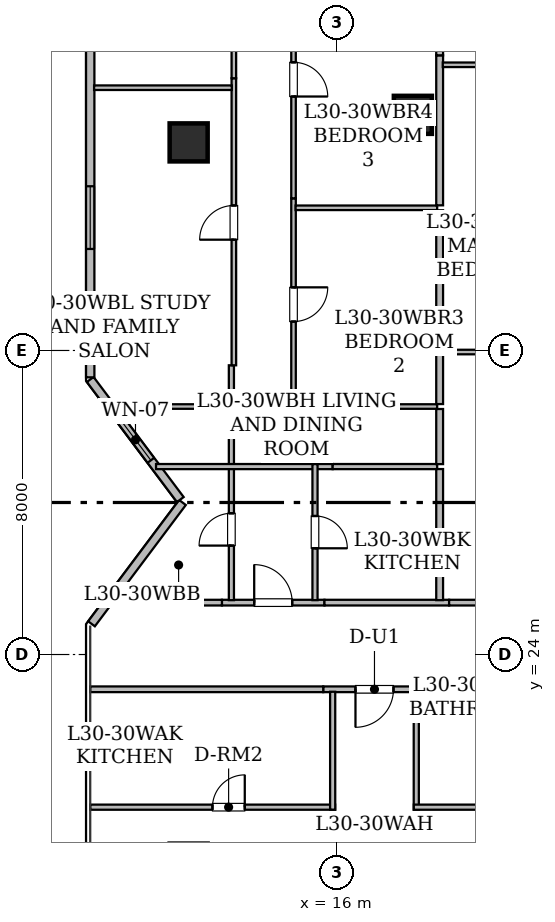
"""IFC4 building model, lengths in metres.
Left out: names, types, materials, properties, quantities, classifications, styles, units other than length and angle.
Written with IfcOpenShell. Run it as: python <this file> out.ifc"""

import sys

from ifc_helpers import new_model, si_unit, direction, frame, frame_2d, origin, origin_2d, place, context, subcontext, project, spatial, rectangle, hollow_rectangle, extrude, element, fill, save


model = new_model("IFC4")
c1 = context("Model", 3, precision=1e-05, world=origin(), true_north=direction((0.0, 1.0)))
c2 = subcontext(c1, "Body", "Model", "MODEL_VIEW")
j1 = project(units=[si_unit("LENGTHUNIT", "METRE"), si_unit("PLANEANGLEUNIT", "RADIAN")], contexts=[c1])
p1 = place(None, origin())
s1 = spatial("IfcSite", under=j1, at=p1, CompositionType="ELEMENT")
p2 = place(p1, origin())
s2 = spatial("IfcBuilding", under=s1, at=p2, CompositionType="ELEMENT")
p3 = place(p2, frame((0.0, 0.0, 120.15)))
s3 = spatial("IfcBuildingStorey", under=s2, at=p3, CompositionType="ELEMENT", Elevation=120.15)
for number, where, z_axis, x_axis in (
    (1, (12.1, 37.475, 0.0), (0.0, 0.0, 1.0), (1.0, 0.0, 0.0)),
    (2, (18.0, 38.2, 0.0), (0.0, 0.0, 1.0), (1.0, 0.0, 0.0)),
):
    element("IfcColumn", number, at=place(p3, frame(where, z_axis=z_axis, x_axis=x_axis)), inside=s3, PredefinedType="COLUMN", context=c2, shape_type="SweptSolid", body=[
        extrude(hollow_rectangle(XDim=1.0, YDim=1.0, WallThickness=0.05, at=origin_2d()), origin(), (0.0, 0.0, 1.0), 3.65),
    ])
p4 = place(p3, frame((9.544, 24.808, 0.0), z_axis=(0.0, 0.0, 1.0), x_axis=(0.600019580308, 0.799985314394, 0.0)))
e3 = element("IfcWall", 3, at=p4, inside=s3, PredefinedType="STANDARD", context=c2, shape_type="SweptSolid", body=[
    extrude(rectangle(XDim=3.99, YDim=0.22, at=frame_2d((1.995, 0.0))), origin(), (0.0, 0.0, 1.0), 3.43),
])
p5 = place(p3, frame((11.881, 28.077, 0.0), z_axis=(0.0, 0.0, 1.0), x_axis=(-0.600158184825, 0.799881336942, 0.0)))
e4 = element("IfcWall", 4, at=p5, inside=s3, PredefinedType="STANDARD", context=c2, shape_type="SweptSolid", body=[
    extrude(rectangle(XDim=3.951, YDim=0.22, at=frame_2d((1.975, 0.0))), origin(), (0.0, 0.0, 1.0), 3.43),
])
p6 = place(p5, frame((1.291, 0.0, 0.85)))
e5 = element("IfcOpeningElement", 5, at=p6, cuts=e4, PredefinedType="OPENING", context=c2, shape_type="SweptSolid", body=[
    extrude(rectangle(XDim=1.35, YDim=1.5, at=frame_2d((0.675, 0.75))), frame((0.0, 0.12, 0.0), z_axis=(0.0, -1.0, 0.0), x_axis=(1.0, 0.0, 0.0)), (0.0, 0.0, 1.0), 0.24),
])
p7 = place(p3, frame((9.51, 31.293, 0.0), z_axis=(0.0, 0.0, 1.0), x_axis=(0.0, 1.0, 0.0)))
e6 = element("IfcWall", 6, at=p7, inside=s3, PredefinedType="STANDARD", context=c2, shape_type="SweptSolid", body=[
    extrude(rectangle(XDim=14.061, YDim=0.22, at=frame_2d((7.031, 0.0))), origin(), (0.0, 0.0, 1.0), 3.43),
])
p8 = place(p7, frame((3.378, 0.0, 0.85)))
e7 = element("IfcOpeningElement", 7, at=p8, cuts=e6, PredefinedType="OPENING", context=c2, shape_type="SweptSolid", body=[
    extrude(rectangle(XDim=1.65, YDim=1.55, at=frame_2d((0.825, 0.775))), frame((0.0, 0.12, 0.0), z_axis=(0.0, -1.0, 0.0), x_axis=(1.0, 0.0, 0.0)), (0.0, 0.0, 1.0), 0.24),
])
p9 = place(p7, frame((9.624, 0.0, 0.85)))
e8 = element("IfcOpeningElement", 8, at=p9, cuts=e6, PredefinedType="OPENING", context=c2, shape_type="SweptSolid", body=[
    extrude(rectangle(XDim=1.65, YDim=1.55, at=frame_2d((0.825, 0.775))), frame((0.0, 0.12, 0.0), z_axis=(0.0, -1.0, 0.0), x_axis=(1.0, 0.0, 0.0)), (0.0, 0.0, 1.0), 0.24),
])
p10 = place(p3, frame((18.339, 23.085, 0.0), z_axis=(0.0, 0.0, 1.0), x_axis=(-1.0, 0.0, 0.0)))
e9 = element("IfcWall", 9, at=p10, inside=s3, PredefinedType="STANDARD", context=c2, shape_type="SweptSolid", body=[
    extrude(rectangle(XDim=2.698, YDim=0.15, at=frame_2d((1.349, 0.0))), origin(), (0.0, 0.0, 1.0), 2.647),
])
p11 = place(p10, frame((0.849, 0.0, 0.0)))
e10 = element("IfcOpeningElement", 10, at=p11, cuts=e9, PredefinedType="OPENING", context=c2, shape_type="SweptSolid", body=[
    extrude(rectangle(XDim=1.0, YDim=2.15, at=frame_2d((0.5, 1.075))), frame((0.0, 0.085, 0.0), z_axis=(0.0, -1.0, 0.0), x_axis=(1.0, 0.0, 0.0)), (0.0, 0.0, 1.0), 0.17),
])
p12 = place(p3, frame((22.706, 23.085, 0.0), z_axis=(0.0, 0.0, 1.0), x_axis=(-1.0, 0.0, 0.0)))
e11 = element("IfcWall", 11, at=p12, inside=s3, PredefinedType="STANDARD", context=c2, shape_type="SweptSolid", body=[
    extrude(rectangle(XDim=4.367, YDim=0.15, at=frame_2d((2.184, 0.0))), origin(), (0.0, 0.0, 1.0), 3.43),
])
p13 = place(p3, frame((15.641, 23.085, 0.0), z_axis=(0.0, 0.0, 1.0), x_axis=(-1.0, 0.0, 0.0)))
e12 = element("IfcWall", 12, at=p13, inside=s3, PredefinedType="STANDARD", context=c2, shape_type="SweptSolid", body=[
    extrude(rectangle(XDim=6.131, YDim=0.15, at=frame_2d((3.065, 0.0))), origin(), (0.0, 0.0, 1.0), 2.876),
])
p14 = place(p3, frame((12.976, 25.365, 0.0), z_axis=(0.0, 0.0, 1.0), x_axis=(1.0, 0.0, 0.0)))
e13 = element("IfcWall", 13, at=p14, inside=s3, PredefinedType="STANDARD", context=c2, shape_type="SweptSolid", body=[
    extrude(rectangle(XDim=2.698, YDim=0.15, at=frame_2d((1.349, 0.0))), origin(), (0.0, 0.0, 1.0), 3.43),
])
p15 = place(p14, frame((0.849, 0.0, 0.0)))
e14 = element("IfcOpeningElement", 14, at=p15, cuts=e13, PredefinedType="OPENING", context=c2, shape_type="SweptSolid", body=[
    extrude(rectangle(XDim=1.0, YDim=2.15, at=frame_2d((0.5, 1.075))), frame((0.0, 0.085, 0.0), z_axis=(0.0, -1.0, 0.0), x_axis=(1.0, 0.0, 0.0)), (0.0, 0.0, 1.0), 0.17),
])
p16 = place(p3, frame((9.974, 25.365, 0.0), z_axis=(0.0, 0.0, 1.0), x_axis=(1.0, 0.0, 0.0)))
e15 = element("IfcWall", 15, at=p16, inside=s3, PredefinedType="STANDARD", context=c2, shape_type="SweptSolid", body=[
    extrude(rectangle(XDim=3.002, YDim=0.15, at=frame_2d((1.501, 0.0))), origin(), (0.0, 0.0, 1.0), 2.876),
])
p17 = place(p3, frame((15.674, 25.365, 0.0), z_axis=(0.0, 0.0, 1.0), x_axis=(1.0, 0.0, 0.0)))
e16 = element("IfcWall", 16, at=p17, inside=s3, PredefinedType="STANDARD", context=c2, shape_type="SweptSolid", body=[
    extrude(rectangle(XDim=3.28, YDim=0.15, at=frame_2d((1.64, 0.0))), origin(), (0.0, 0.0, 1.0), 2.647),
])
p18 = place(p3, frame((18.954, 25.365, 0.0), z_axis=(0.0, 0.0, 1.0), x_axis=(1.0, 0.0, 0.0)))
e17 = element("IfcWall", 17, at=p18, inside=s3, PredefinedType="STANDARD", context=c2, shape_type="SweptSolid", body=[
    extrude(rectangle(XDim=3.522, YDim=0.15, at=frame_2d((1.761, 0.0))), origin(), (0.0, 0.0, 1.0), 3.43),
])
p19 = place(p3, frame((18.09, 23.02, 0.0), z_axis=(0.0, 0.0, 1.0), x_axis=(0.0, -1.0, 0.0)))
e18 = element("IfcWall", 18, at=p19, inside=s3, PredefinedType="PARTITIONING", context=c2, shape_type="SweptSolid", body=[
    extrude(rectangle(XDim=3.102, YDim=0.135, at=frame_2d((1.551, 0.0))), origin(), (0.0, 0.0, 1.0), 2.647),
])
p20 = place(p3, frame((18.025, 19.983, 0.0), z_axis=(0.0, 0.0, 1.0), x_axis=(1.0, 0.0, 0.0)))
e19 = element("IfcWall", 19, at=p20, inside=s3, PredefinedType="PARTITIONING", context=c2, shape_type="SweptSolid", body=[
    extrude(rectangle(XDim=4.995, YDim=0.135, at=frame_2d((2.498, 0.0))), origin(), (0.0, 0.0, 1.0), 2.647),
])
p21 = place(p20, frame((2.073, 0.0, 0.0)))
e20 = element("IfcOpeningElement", 20, at=p21, cuts=e19, PredefinedType="OPENING", context=c2, shape_type="SweptSolid", body=[
    extrude(rectangle(XDim=0.85, YDim=2.1, at=frame_2d((0.425, 1.05))), frame((0.0, 0.077, 0.0), z_axis=(0.0, -1.0, 0.0), x_axis=(1.0, 0.0, 0.0)), (0.0, 0.0, 1.0), 0.155),
])
p22 = place(p3, frame((9.51, 19.983, 0.0), z_axis=(0.0, 0.0, 1.0), x_axis=(1.0, 0.0, 0.0)))
e21 = element("IfcWall", 21, at=p22, inside=s3, PredefinedType="PARTITIONING", context=c2, shape_type="SweptSolid", body=[
    extrude(rectangle(XDim=6.445, YDim=0.135, at=frame_2d((3.223, 0.0))), origin(), (0.0, 0.0, 1.0), 2.876),
])
p23 = place(p22, frame((3.217, 0.0, 0.0)))
e22 = element("IfcOpeningElement", 22, at=p23, cuts=e21, PredefinedType="OPENING", context=c2, shape_type="SweptSolid", body=[
    extrude(rectangle(XDim=0.85, YDim=2.1, at=frame_2d((0.425, 1.05))), frame((0.0, 0.077, 0.0), z_axis=(0.0, -1.0, 0.0), x_axis=(1.0, 0.0, 0.0)), (0.0, 0.0, 1.0), 0.155),
])
p24 = place(p3, frame((15.89, 19.918, 0.0), z_axis=(0.0, 0.0, 1.0), x_axis=(0.0, 1.0, 0.0)))
e23 = element("IfcWall", 23, at=p24, inside=s3, PredefinedType="PARTITIONING", context=c2, shape_type="SweptSolid", body=[
    extrude(rectangle(XDim=3.102, YDim=0.135, at=frame_2d((1.551, 0.0))), origin(), (0.0, 0.0, 1.0), 3.43),
])
p25 = place(p3, frame((13.225, 25.43, 0.0), z_axis=(0.0, 0.0, 1.0), x_axis=(0.0, 1.0, 0.0)))
e24 = element("IfcWall", 24, at=p25, inside=s3, PredefinedType="PARTITIONING", context=c2, shape_type="SweptSolid", body=[
    extrude(rectangle(XDim=6.18, YDim=0.135, at=frame_2d((3.09, 0.0))), origin(), (0.0, 0.0, 1.0), 3.43),
])
p26 = place(p25, frame((1.436, 0.0, 0.0)))
e25 = element("IfcOpeningElement", 25, at=p26, cuts=e24, PredefinedType="OPENING", context=c2, shape_type="SweptSolid", body=[
    extrude(rectangle(XDim=0.85, YDim=2.1, at=frame_2d((0.425, 1.05))), frame((0.0, 0.077, 0.0), z_axis=(0.0, -1.0, 0.0), x_axis=(1.0, 0.0, 0.0)), (0.0, 0.0, 1.0), 0.155),
])
p27 = place(p3, frame((15.89, 28.945, 0.0), z_axis=(0.0, 0.0, 1.0), x_axis=(-1.0, 0.0, 0.0)))
e26 = element("IfcWall", 26, at=p27, inside=s3, PredefinedType="PARTITIONING", context=c2, shape_type="SweptSolid", body=[
    extrude(rectangle(XDim=4.648, YDim=0.135, at=frame_2d((2.324, 0.0))), origin(), (0.0, 0.0, 1.0), 2.876),
])
p28 = place(p3, frame((18.64, 28.945, 0.0), z_axis=(0.0, 0.0, 1.0), x_axis=(-1.0, 0.0, 0.0)))
e27 = element("IfcWall", 27, at=p28, inside=s3, PredefinedType="PARTITIONING", context=c2, shape_type="SweptSolid", body=[
    extrude(rectangle(XDim=2.75, YDim=0.135, at=frame_2d((1.375, 0.0))), origin(), (0.0, 0.0, 1.0), 2.647),
])
p29 = place(p3, frame((15.425, 29.01, 0.0), z_axis=(0.0, 0.0, 1.0), x_axis=(0.0, -1.0, 0.0)))
e28 = element("IfcWall", 28, at=p29, inside=s3, PredefinedType="PARTITIONING", context=c2, shape_type="SweptSolid", body=[
    extrude(rectangle(XDim=3.58, YDim=0.135, at=frame_2d((1.79, 0.0))), origin(), (0.0, 0.0, 1.0), 3.43),
])
p30 = place(p29, frame((1.365, 0.0, 0.0)))
e29 = element("IfcOpeningElement", 29, at=p30, cuts=e28, PredefinedType="OPENING", context=c2, shape_type="SweptSolid", body=[
    extrude(rectangle(XDim=0.85, YDim=2.1, at=frame_2d((0.425, 1.05))), frame((0.0, 0.077, 0.0), z_axis=(0.0, -1.0, 0.0), x_axis=(1.0, 0.0, 0.0)), (0.0, 0.0, 1.0), 0.155),
])
p31 = place(p3, frame((13.29, 31.61, 0.0), z_axis=(0.0, 0.0, 1.0), x_axis=(0.0, 1.0, 0.0)))
e30 = element("IfcWall", 30, at=p31, inside=s3, PredefinedType="PARTITIONING", context=c2, shape_type="SweptSolid", body=[
    extrude(rectangle(XDim=7.553, YDim=0.12, at=frame_2d((3.776, 0.0))), origin(), (0.0, 0.0, 1.0), 2.687),
])
p32 = place(p31, frame((3.305, 0.0, 0.0)))
e31 = element("IfcOpeningElement", 31, at=p32, cuts=e30, PredefinedType="OPENING", context=c2, shape_type="SweptSolid", body=[
    extrude(rectangle(XDim=0.9, YDim=2.1, at=frame_2d((0.45, 1.05))), frame((0.0, 0.07, 0.0), z_axis=(0.0, -1.0, 0.0), x_axis=(1.0, 0.0, 0.0)), (0.0, 0.0, 1.0), 0.14),
])
p33 = place(p3, frame((10.156, 30.525, 0.0), z_axis=(0.0, 0.0, 1.0), x_axis=(1.0, 0.0, 0.0)))
e32 = element("IfcWall", 32, at=p33, inside=s3, PredefinedType="PARTITIONING", context=c2, shape_type="SweptSolid", body=[
    extrude(rectangle(XDim=3.134, YDim=0.12, at=frame_2d((1.567, 0.0))), origin(), (0.0, 0.0, 1.0), 2.876),
])
p34 = place(p3, frame((13.29, 39.163, 0.0), z_axis=(0.0, 0.0, 1.0), x_axis=(0.0, 1.0, 0.0)))
e33 = element("IfcWall", 33, at=p34, inside=s3, PredefinedType="PARTITIONING", context=c2, shape_type="SweptSolid", body=[
    extrude(rectangle(XDim=9.98, YDim=0.12, at=frame_2d((4.99, 0.0))), origin(), (0.0, 0.0, 1.0), 2.876),
])
p35 = place(p34, frame((4.54, 0.0, 0.0)))
e34 = element("IfcOpeningElement", 34, at=p35, cuts=e33, PredefinedType="OPENING", context=c2, shape_type="SweptSolid", body=[
    extrude(rectangle(XDim=0.9, YDim=2.1, at=frame_2d((0.45, 1.05))), frame((0.0, 0.07, 0.0), z_axis=(0.0, -1.0, 0.0), x_axis=(1.0, 0.0, 0.0)), (0.0, 0.0, 1.0), 0.14),
])
p36 = place(p3, frame((14.86, 36.003, 0.0), z_axis=(0.0, 0.0, 1.0), x_axis=(0.0, -1.0, 0.0)))
e35 = element("IfcWall", 35, at=p36, inside=s3, PredefinedType="PARTITIONING", context=c2, shape_type="SweptSolid", body=[
    extrude(rectangle(XDim=5.543, YDim=0.12, at=frame_2d((2.771, 0.0))), origin(), (0.0, 0.0, 1.0), 2.687),
])
p37 = place(p36, frame((2.342, 0.0, 0.0)))
e36 = element("IfcOpeningElement", 36, at=p37, cuts=e35, PredefinedType="OPENING", context=c2, shape_type="SweptSolid", body=[
    extrude(rectangle(XDim=0.9, YDim=2.1, at=frame_2d((0.45, 1.05))), frame((0.0, 0.07, 0.0), z_axis=(0.0, -1.0, 0.0), x_axis=(1.0, 0.0, 0.0)), (0.0, 0.0, 1.0), 0.14),
])
p38 = place(p3, frame((14.795, 30.525, 0.0), z_axis=(0.0, 0.0, 1.0), x_axis=(1.0, 0.0, 0.0)))
e37 = element("IfcWall", 37, at=p38, inside=s3, PredefinedType="PARTITIONING", context=c2, shape_type="SweptSolid", body=[
    extrude(rectangle(XDim=3.845, YDim=0.12, at=frame_2d((1.922, 0.0))), origin(), (0.0, 0.0, 1.0), 2.647),
])
p39 = place(p3, frame((14.86, 42.303, 0.0), z_axis=(0.0, 0.0, 1.0), x_axis=(0.0, -1.0, 0.0)))
e38 = element("IfcWall", 38, at=p39, inside=s3, PredefinedType="PARTITIONING", context=c2, shape_type="SweptSolid", body=[
    extrude(rectangle(XDim=6.3, YDim=0.12, at=frame_2d((3.15, 0.0))), origin(), (0.0, 0.0, 1.0), 2.687),
])
p40 = place(p39, frame((2.721, 0.0, 0.0)))
e39 = element("IfcOpeningElement", 39, at=p40, cuts=e38, PredefinedType="OPENING", context=c2, shape_type="SweptSolid", body=[
    extrude(rectangle(XDim=0.9, YDim=2.1, at=frame_2d((0.45, 1.05))), frame((0.0, 0.07, 0.0), z_axis=(0.0, -1.0, 0.0), x_axis=(1.0, 0.0, 0.0)), (0.0, 0.0, 1.0), 0.14),
])
p41 = place(p3, frame((18.705, 30.46, 0.0), z_axis=(0.0, 0.0, 1.0), x_axis=(0.0, -1.0, 0.0)))
e40 = element("IfcWall", 40, at=p41, inside=s3, PredefinedType="STANDARD", context=c2, shape_type="SweptSolid", body=[
    extrude(rectangle(XDim=1.45, YDim=0.18, at=frame_2d((0.725, 0.0))), origin(), (0.0, 0.0, 1.0), 3.43),
])
p42 = place(p3, frame((18.705, 28.88, 0.0), z_axis=(0.0, 0.0, 1.0), x_axis=(0.0, -1.0, 0.0)))
e41 = element("IfcWall", 41, at=p42, inside=s3, PredefinedType="STANDARD", context=c2, shape_type="SweptSolid", body=[
    extrude(rectangle(XDim=3.45, YDim=0.18, at=frame_2d((1.725, 0.0))), origin(), (0.0, 0.0, 1.0), 3.013),
])
p43 = place(p3, frame((9.612, 38.914, 0.0), z_axis=(0.0, 0.0, 1.0), x_axis=(1.0, 0.0, 0.0)))
e42 = element("IfcWall", 42, at=p43, inside=s3, PredefinedType="PARTITIONING", context=c2, shape_type="SweptSolid", body=[
    extrude(rectangle(XDim=3.624, YDim=0.12, at=frame_2d((1.812, 0.0))), origin(), (0.0, 0.0, 1.0), 2.876),
])
p44 = place(p3, frame((14.914, 35.754, 0.0), z_axis=(0.0, 0.0, 1.0), x_axis=(1.0, 0.0, 0.0)))
e43 = element("IfcWall", 43, at=p44, inside=s3, PredefinedType="PARTITIONING", context=c2, shape_type="SweptSolid", body=[
    extrude(rectangle(XDim=3.726, YDim=0.12, at=frame_2d((1.863, 0.0))), origin(), (0.0, 0.0, 1.0), 2.647),
])
p45 = place(p3, frame((18.705, 32.208, 0.0), z_axis=(0.0, 0.0, 1.0), x_axis=(0.0, -1.0, 0.0)))
e44 = element("IfcWall", 44, at=p45, inside=s3, PredefinedType="STANDARD", context=c2, shape_type="SweptSolid", body=[
    extrude(rectangle(XDim=1.618, YDim=0.18, at=frame_2d((0.809, 0.0))), origin(), (0.0, 0.0, 1.0), 3.43),
])
p46 = place(p3, frame((18.705, 35.689, 0.0), z_axis=(0.0, 0.0, 1.0), x_axis=(0.0, -1.0, 0.0)))
e45 = element("IfcWall", 45, at=p46, inside=s3, PredefinedType="STANDARD", context=c2, shape_type="SweptSolid", body=[
    extrude(rectangle(XDim=3.481, YDim=0.18, at=frame_2d((1.74, 0.0))), origin(), (0.0, 0.0, 1.0), 3.43),
])
p47 = place(p3, frame((18.705, 39.766, 0.0), z_axis=(0.0, 0.0, 1.0), x_axis=(0.0, -1.0, 0.0)))
e46 = element("IfcWall", 46, at=p47, inside=s3, PredefinedType="STANDARD", context=c2, shape_type="SweptSolid", body=[
    extrude(rectangle(XDim=3.947, YDim=0.18, at=frame_2d((1.974, 0.0))), origin(), (0.0, 0.0, 1.0), 2.647),
])
p48 = place(p3, frame((18.705, 41.989, 0.0), z_axis=(0.0, 0.0, 1.0), x_axis=(0.0, -1.0, 0.0)))
e47 = element("IfcWall", 47, at=p48, inside=s3, PredefinedType="STANDARD", context=c2, shape_type="SweptSolid", body=[
    extrude(rectangle(XDim=2.223, YDim=0.18, at=frame_2d((1.111, 0.0))), origin(), (0.0, 0.0, 1.0), 3.43),
])
for number, where, z_axis, x_axis in (
    (48, (18.787, 31.959, 0.0), (0.0, 0.0, 1.0), (1.0, 0.0, 0.0)),
    (49, (18.787, 39.517, 0.0), (0.0, 0.0, 1.0), (1.0, 0.0, 0.0)),
):
    element("IfcWall", number, at=place(p3, frame(where, z_axis=z_axis, x_axis=x_axis)), inside=s3, PredefinedType="PARTITIONING", context=c2, shape_type="SweptSolid", body=[
        extrude(rectangle(XDim=3.884, YDim=0.12, at=frame_2d((1.942, 0.0))), origin(), (0.0, 0.0, 1.0), 3.43),
    ])
p49 = place(p6, origin())
e50 = element("IfcWindow", 50, at=p49, inside=s3, PartitioningType="SINGLE_PANEL", PredefinedType="WINDOW", context=c2, shape_type="SweptSolid", body=[
    extrude(rectangle(XDim=1.35, YDim=1.5, at=frame_2d((0.675, 0.75))), frame((0.0, 0.03, 0.0), z_axis=(0.0, -1.0, 0.0), x_axis=(1.0, 0.0, 0.0)), (0.0, 0.0, 1.0), 0.06),
])
fill(e5, e50)
p50 = place(p8, origin())
e51 = element("IfcWindow", 51, at=p50, inside=s3, PartitioningType="SINGLE_PANEL", PredefinedType="WINDOW", context=c2, shape_type="SweptSolid", body=[
    extrude(rectangle(XDim=1.65, YDim=1.55, at=frame_2d((0.825, 0.775))), frame((0.0, 0.03, 0.0), z_axis=(0.0, -1.0, 0.0), x_axis=(1.0, 0.0, 0.0)), (0.0, 0.0, 1.0), 0.06),
])
fill(e7, e51)
p51 = place(p11, origin())
e52 = element("IfcDoor", 52, at=p51, inside=s3, OperationType="SINGLE_SWING_RIGHT", PredefinedType="DOOR", context=c2, shape_type="SweptSolid", body=[
    extrude(rectangle(XDim=1.0, YDim=2.15, at=frame_2d((0.5, 1.075))), frame((0.0, 0.025, 0.0), z_axis=(0.0, -1.0, 0.0), x_axis=(1.0, 0.0, 0.0)), (0.0, 0.0, 1.0), 0.05),
])
fill(e10, e52)
p52 = place(p15, origin())
e53 = element("IfcDoor", 53, at=p52, inside=s3, OperationType="SINGLE_SWING_LEFT", PredefinedType="DOOR", context=c2, shape_type="SweptSolid", body=[
    extrude(rectangle(XDim=1.0, YDim=2.15, at=frame_2d((0.5, 1.075))), frame((0.0, 0.025, 0.0), z_axis=(0.0, -1.0, 0.0), x_axis=(1.0, 0.0, 0.0)), (0.0, 0.0, 1.0), 0.05),
])
fill(e14, e53)
p53 = place(p23, origin())
e54 = element("IfcDoor", 54, at=p53, inside=s3, OperationType="SINGLE_SWING_RIGHT", PredefinedType="DOOR", context=c2, shape_type="SweptSolid", body=[
    extrude(rectangle(XDim=0.85, YDim=2.1, at=frame_2d((0.425, 1.05))), frame((0.0, 0.025, 0.0), z_axis=(0.0, -1.0, 0.0), x_axis=(1.0, 0.0, 0.0)), (0.0, 0.0, 1.0), 0.05),
])
fill(e22, e54)
p54 = place(p26, origin())
e55 = element("IfcDoor", 55, at=p54, inside=s3, OperationType="SINGLE_SWING_LEFT", PredefinedType="DOOR", context=c2, shape_type="SweptSolid", body=[
    extrude(rectangle(XDim=0.85, YDim=2.1, at=frame_2d((0.425, 1.05))), frame((0.0, 0.025, 0.0), z_axis=(0.0, -1.0, 0.0), x_axis=(1.0, 0.0, 0.0)), (0.0, 0.0, 1.0), 0.05),
])
fill(e25, e55)
p55 = place(p30, origin())
e56 = element("IfcDoor", 56, at=p55, inside=s3, OperationType="SINGLE_SWING_RIGHT", PredefinedType="DOOR", context=c2, shape_type="SweptSolid", body=[
    extrude(rectangle(XDim=0.85, YDim=2.1, at=frame_2d((0.425, 1.05))), frame((0.0, 0.025, 0.0), z_axis=(0.0, -1.0, 0.0), x_axis=(1.0, 0.0, 0.0)), (0.0, 0.0, 1.0), 0.05),
])
fill(e29, e56)
p56 = place(p32, origin())
e57 = element("IfcDoor", 57, at=p56, inside=s3, OperationType="SINGLE_SWING_LEFT", PredefinedType="DOOR", context=c2, shape_type="SweptSolid", body=[
    extrude(rectangle(XDim=0.9, YDim=2.1, at=frame_2d((0.45, 1.05))), frame((0.0, 0.025, 0.0), z_axis=(0.0, -1.0, 0.0), x_axis=(1.0, 0.0, 0.0)), (0.0, 0.0, 1.0), 0.05),
])
fill(e31, e57)
p57 = place(p37, origin())
e58 = element("IfcDoor", 58, at=p57, inside=s3, OperationType="SINGLE_SWING_LEFT", PredefinedType="DOOR", context=c2, shape_type="SweptSolid", body=[
    extrude(rectangle(XDim=0.9, YDim=2.1, at=frame_2d((0.45, 1.05))), frame((0.0, 0.025, 0.0), z_axis=(0.0, -1.0, 0.0), x_axis=(1.0, 0.0, 0.0)), (0.0, 0.0, 1.0), 0.05),
])
fill(e36, e58)
p58 = place(p40, origin())
e59 = element("IfcDoor", 59, at=p58, inside=s3, OperationType="SINGLE_SWING_RIGHT", PredefinedType="DOOR", context=c2, shape_type="SweptSolid", body=[
    extrude(rectangle(XDim=0.9, YDim=2.1, at=frame_2d((0.45, 1.05))), frame((0.0, 0.025, 0.0), z_axis=(0.0, -1.0, 0.0), x_axis=(1.0, 0.0, 0.0)), (0.0, 0.0, 1.0), 0.05),
])
fill(e39, e59)
save(model, sys.argv[1])
